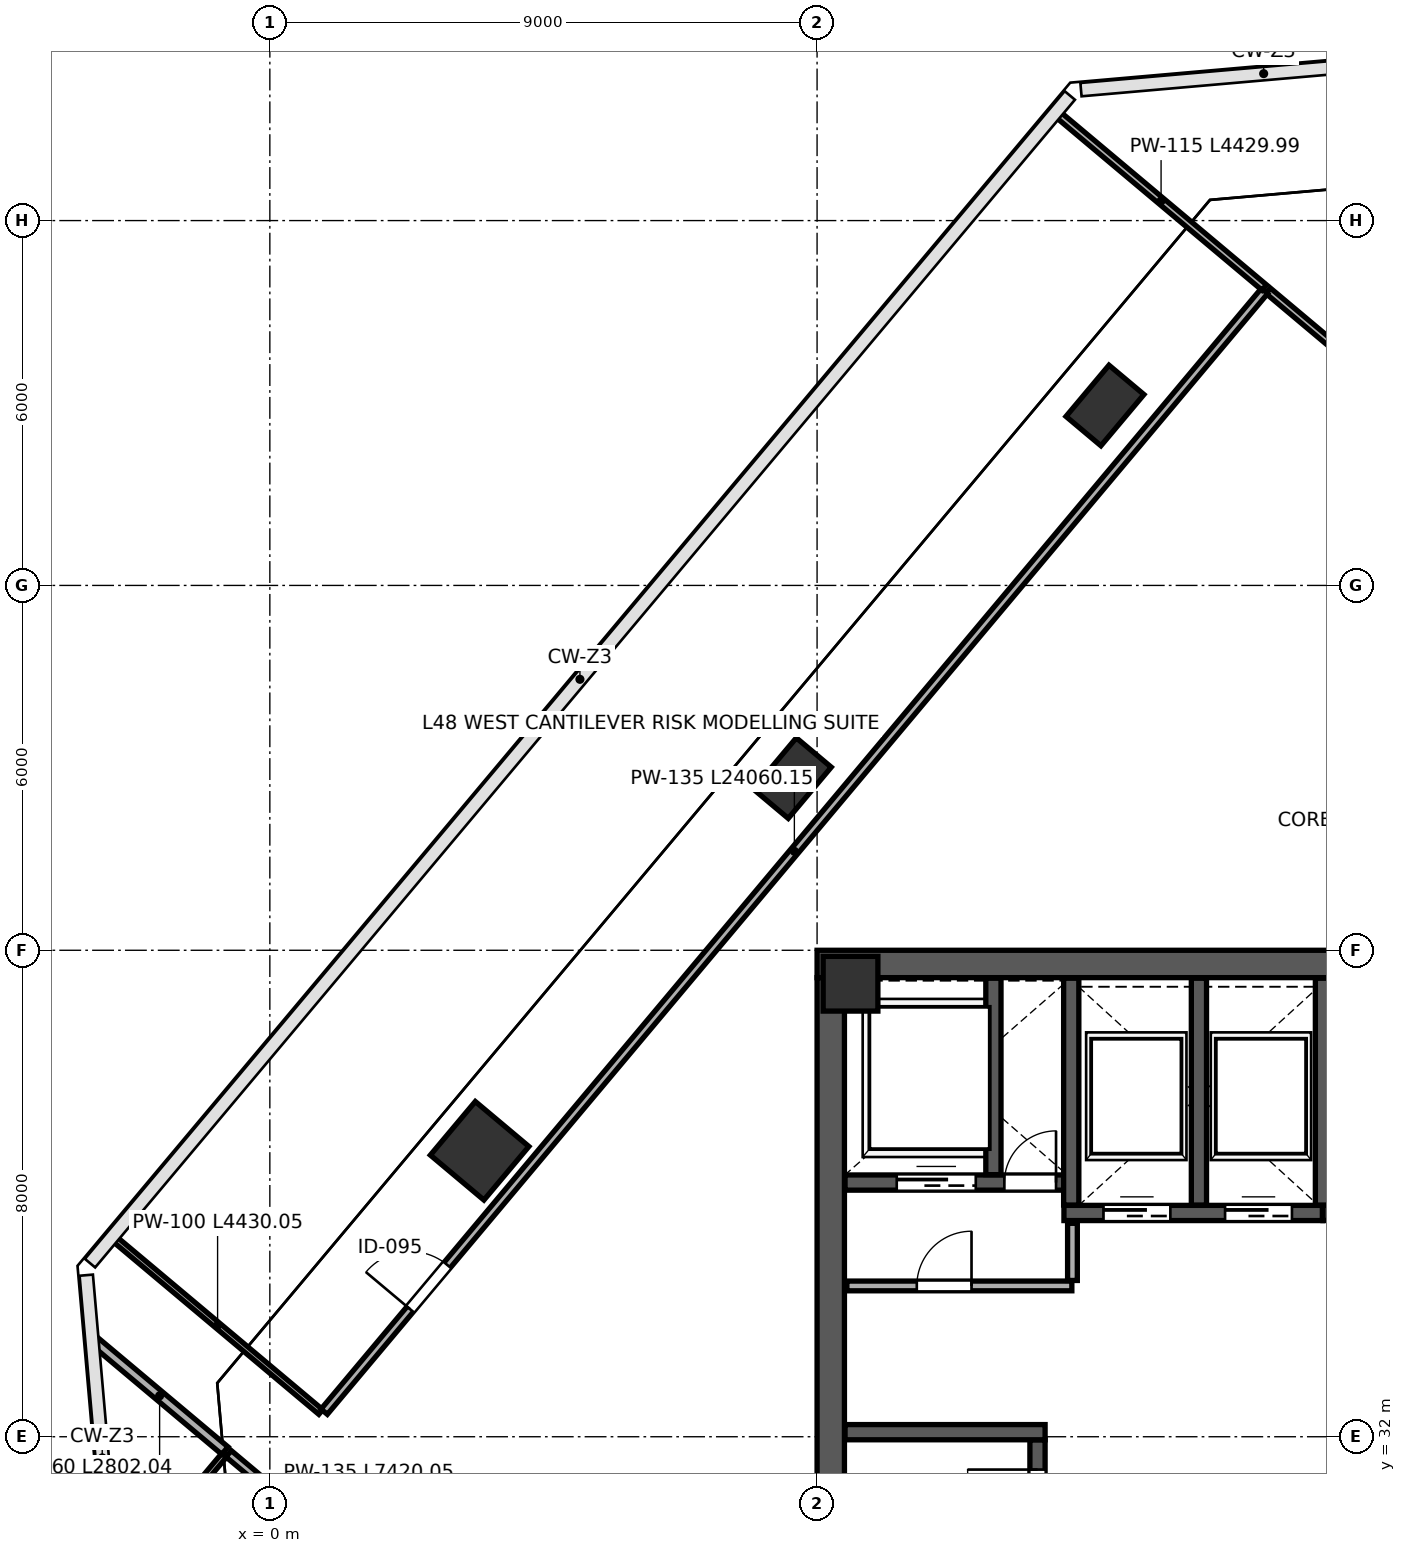
"""IFC4 building model, lengths in metres.
Left out: names, types, materials, properties, quantities, classifications, styles, units other than length and angle.
Written with IfcOpenShell. Run it as: python <this file> out.ifc"""

import sys

from ifc_helpers import new_model, si_unit, direction, frame, frame_2d, origin, origin_2d, place, context, subcontext, project, spatial, rectangle, extrude, source, transform, mapped, element, fill, save


model = new_model("IFC4")
c1 = context("Model", 3, precision=1e-05, world=origin(), true_north=direction((0.0, 1.0)))
c2 = subcontext(c1, "Body", "Model", "MODEL_VIEW")
j1 = project(units=[si_unit("LENGTHUNIT", "METRE"), si_unit("PLANEANGLEUNIT", "RADIAN")], contexts=[c1])
p1 = place(None, origin())
s1 = spatial("IfcSite", under=j1, at=p1, CompositionType="ELEMENT")
p2 = place(p1, origin())
s2 = spatial("IfcBuilding", under=s1, at=p2, CompositionType="ELEMENT")
p3 = place(p2, frame((0.0, 0.0, 215.2)))
s3 = spatial("IfcBuildingStorey", under=s2, at=p3, CompositionType="ELEMENT", Elevation=215.2)
m1 = source(origin(), c2, "Body", "SweptSolid", [
    extrude(rectangle(XDim=0.9, YDim=0.9, at=origin_2d()), origin(), (0.0, 0.0, 1.0), 5.399),
])
p4 = place(p3, frame((9.55, 39.45, 0.001), z_axis=(0.0, 0.0, 1.0), x_axis=(1.0, 0.0, 0.0)))
e1 = element("IfcColumn", 1, at=p4, inside=s3, PredefinedType="COLUMN", context=c2, shape_type="MappedRepresentation", body=[
    mapped(m1, transform((0.0, 0.0, 0.0), scale=1.0)),
])
m2 = source(origin(), c2, "Body", "SweptSolid", [
    extrude(rectangle(XDim=1.15, YDim=1.15, at=origin_2d()), origin(), (0.0, 0.0, 1.0), 5.399),
])
p5 = place(p3, frame((3.45, 36.703, 0.001), z_axis=(0.0, 0.0, 1.0), x_axis=(-0.766044443119, 0.642787609687, 0.0)))
e2 = element("IfcColumn", 2, at=p5, inside=s3, PredefinedType="COLUMN", context=c2, shape_type="MappedRepresentation", body=[
    mapped(m2, transform((0.0, 0.0, 0.0), scale=1.0)),
])
m3 = source(origin(), c2, "Body", "SweptSolid", [
    extrude(rectangle(XDim=0.75, YDim=1.1, at=origin_2d()), origin(), (0.0, 0.0, 1.0), 5.399),
])
for number, where, z_axis, x_axis in (
    (3, (8.592, 42.831, 0.001), (0.0, 0.0, 1.0), (-0.766, 0.643, 0.0)),
    (4, (13.735, 48.959, 0.001), (0.0, 0.0, 1.0), (-0.766, 0.643, 0.0)),
):
    element("IfcColumn", number, at=place(p3, frame(where, z_axis=z_axis, x_axis=x_axis)), inside=s3, PredefinedType="PILASTER", context=c2, shape_type="MappedRepresentation", body=[
        mapped(m3, transform((0.0, 0.0, 0.0), scale=1.0)),
    ])
p6 = place(p3, frame((9.225, 24.45, 0.0), z_axis=(0.0, 0.0, 1.0), x_axis=(0.0, 1.0, 0.0)))
e5 = element("IfcWall", 5, at=p6, inside=s3, PredefinedType="SHEAR", context=c2, shape_type="SweptSolid", body=[
    extrude(rectangle(XDim=15.1, YDim=0.45, at=frame_2d((7.55, 0.0))), origin(), (0.0, 0.0, 1.0), 5.16),
])
p7 = place(p3, frame((9.0, 39.775, 0.0), z_axis=(0.0, 0.0, 1.0), x_axis=(1.0, 0.0, 0.0)))
e6 = element("IfcWall", 6, at=p7, inside=s3, PredefinedType="SHEAR", context=c2, shape_type="SweptSolid", body=[
    extrude(rectangle(XDim=18.0, YDim=0.45, at=frame_2d((9.0, 0.0))), origin(), (0.0, 0.0, 1.0), 5.16),
])
p8 = place(p3, frame((12.625, 24.46, 0.0), z_axis=(0.0, 0.0, 1.0), x_axis=(0.0, 1.0, 0.0)))
e7 = element("IfcWall", 7, at=p8, inside=s3, PredefinedType="SHEAR", context=c2, shape_type="SweptSolid", body=[
    extrude(rectangle(XDim=7.49, YDim=0.25, at=frame_2d((3.745, 0.0))), origin(), (0.0, 0.0, 1.0), 5.16),
])
p9 = place(p8, frame((5.85, 0.0, 0.0)))
e8 = element("IfcOpeningElement", 8, at=p9, cuts=e7, PredefinedType="OPENING", context=c2, shape_type="SweptSolid", body=[
    extrude(rectangle(XDim=1.15, YDim=2.2, at=frame_2d((0.575, 1.1))), frame((0.0, 0.135, 0.0), z_axis=(0.0, -1.0, 0.0), x_axis=(1.0, 0.0, 0.0)), (0.0, 0.0, 1.0), 0.27),
])
p10 = place(p3, frame((9.46, 32.075, 0.0), z_axis=(0.0, 0.0, 1.0), x_axis=(1.0, 0.0, 0.0)))
e9 = element("IfcWall", 9, at=p10, inside=s3, PredefinedType="SHEAR", context=c2, shape_type="SweptSolid", body=[
    extrude(rectangle(XDim=3.29, YDim=0.25, at=frame_2d((1.645, 0.0))), origin(), (0.0, 0.0, 1.0), 5.16),
])
p11 = place(p3, frame((9.46, 36.18, 0.0), z_axis=(0.0, 0.0, 1.0), x_axis=(1.0, 0.0, 0.0)))
e10 = element("IfcWall", 10, at=p11, inside=s3, PredefinedType="SHEAR", context=c2, shape_type="SweptSolid", body=[
    extrude(rectangle(XDim=3.79, YDim=0.25, at=frame_2d((1.895, 0.0))), origin(), (0.0, 0.0, 1.0), 5.16),
])
p12 = place(p11, frame((2.62, 0.0, 0.0)))
e11 = element("IfcOpeningElement", 11, at=p12, cuts=e10, PredefinedType="OPENING", context=c2, shape_type="SweptSolid", body=[
    extrude(rectangle(XDim=0.85, YDim=2.1, at=frame_2d((0.425, 1.05))), frame((0.0, 0.135, 0.0), z_axis=(0.0, -1.0, 0.0), x_axis=(1.0, 0.0, 0.0)), (0.0, 0.0, 1.0), 0.27),
])
p13 = place(p11, frame((0.85, 0.0, 0.0)))
e12 = element("IfcOpeningElement", 12, at=p13, cuts=e10, PredefinedType="OPENING", context=c2, shape_type="SweptSolid", body=[
    extrude(rectangle(XDim=1.3, YDim=2.25, at=frame_2d((0.65, 1.125))), frame((0.0, 0.135, 0.0), z_axis=(0.0, -1.0, 0.0), x_axis=(1.0, 0.0, 0.0)), (0.0, 0.0, 1.0), 0.27),
])
p14 = place(p3, frame((11.9, 36.31, 0.0), z_axis=(0.0, 0.0, 1.0), x_axis=(0.0, 1.0, 0.0)))
e13 = element("IfcWall", 13, at=p14, inside=s3, PredefinedType="SHEAR", context=c2, shape_type="SweptSolid", body=[
    extrude(rectangle(XDim=3.23, YDim=0.25, at=frame_2d((1.615, 0.0))), origin(), (0.0, 0.0, 1.0), 5.16),
])
p15 = place(p3, frame((13.06, 35.68, 0.0), z_axis=(0.0, 0.0, 1.0), x_axis=(1.0, 0.0, 0.0)))
e14 = element("IfcWall", 14, at=p15, inside=s3, PredefinedType="SHEAR", context=c2, shape_type="SweptSolid", body=[
    extrude(rectangle(XDim=4.25, YDim=0.25, at=frame_2d((2.125, 0.0))), origin(), (0.0, 0.0, 1.0), 5.16),
])
p16 = place(p15, frame((0.65, 0.0, 0.0)))
e15 = element("IfcOpeningElement", 15, at=p16, cuts=e14, PredefinedType="OPENING", context=c2, shape_type="SweptSolid", body=[
    extrude(rectangle(XDim=1.1, YDim=2.2, at=frame_2d((0.55, 1.1))), frame((0.0, 0.135, 0.0), z_axis=(0.0, -1.0, 0.0), x_axis=(1.0, 0.0, 0.0)), (0.0, 0.0, 1.0), 0.27),
])
p17 = place(p15, frame((2.65, 0.0, 0.0)))
e16 = element("IfcOpeningElement", 16, at=p17, cuts=e14, PredefinedType="OPENING", context=c2, shape_type="SweptSolid", body=[
    extrude(rectangle(XDim=1.1, YDim=2.2, at=frame_2d((0.55, 1.1))), frame((0.0, 0.135, 0.0), z_axis=(0.0, -1.0, 0.0), x_axis=(1.0, 0.0, 0.0)), (0.0, 0.0, 1.0), 0.27),
])
for number, where, z_axis, x_axis in (
    (17, (13.18, 35.81, 0.0), (0.0, 0.0, 1.0), (0.0, 1.0, 0.0)),
    (18, (15.28, 35.81, 0.0), (0.0, 0.0, 1.0), (0.0, 1.0, 0.0)),
):
    element("IfcWall", number, at=place(p3, frame(where, z_axis=z_axis, x_axis=x_axis)), inside=s3, PredefinedType="SHEAR", context=c2, shape_type="SweptSolid", body=[
        extrude(rectangle(XDim=3.73, YDim=0.25, at=frame_2d((1.865, 0.0))), origin(), (0.0, 0.0, 1.0), 5.16),
    ])
p18 = place(p3, frame((17.32, 35.68, 0.0), z_axis=(0.0, 0.0, 1.0), x_axis=(1.0, 0.0, 0.0)))
e19 = element("IfcWall", 19, at=p18, inside=s3, PredefinedType="SHEAR", context=c2, shape_type="SweptSolid", body=[
    extrude(rectangle(XDim=3.87, YDim=0.25, at=frame_2d((1.935, 0.0))), origin(), (0.0, 0.0, 1.0), 5.16),
])
p19 = place(p18, frame((0.45, 0.0, 0.0)))
e20 = element("IfcOpeningElement", 20, at=p19, cuts=e19, PredefinedType="OPENING", context=c2, shape_type="SweptSolid", body=[
    extrude(rectangle(XDim=1.1, YDim=2.2, at=frame_2d((0.55, 1.1))), frame((0.0, 0.135, 0.0), z_axis=(0.0, -1.0, 0.0), x_axis=(1.0, 0.0, 0.0)), (0.0, 0.0, 1.0), 0.27),
])
p20 = place(p18, frame((2.35, 0.0, 0.0)))
e21 = element("IfcOpeningElement", 21, at=p20, cuts=e19, PredefinedType="OPENING", context=c2, shape_type="SweptSolid", body=[
    extrude(rectangle(XDim=1.1, YDim=2.2, at=frame_2d((0.55, 1.1))), frame((0.0, 0.135, 0.0), z_axis=(0.0, -1.0, 0.0), x_axis=(1.0, 0.0, 0.0)), (0.0, 0.0, 1.0), 0.27),
])
p21 = place(p3, frame((17.32, 35.81, 0.0), z_axis=(0.0, 0.0, 1.0), x_axis=(0.0, 1.0, 0.0)))
e22 = element("IfcWall", 22, at=p21, inside=s3, PredefinedType="SHEAR", context=c2, shape_type="SweptSolid", body=[
    extrude(rectangle(XDim=3.73, YDim=0.25, at=frame_2d((1.865, 0.0))), origin(), (0.0, 0.0, 1.0), 5.16),
])
p22 = place(p3, frame((9.49, 34.48, 0.0), z_axis=(0.0, 0.0, 1.0), x_axis=(1.0, 0.0, 0.0)))
e23 = element("IfcWall", 23, at=p22, inside=s3, PredefinedType="PARTITIONING", context=c2, shape_type="SweptSolid", body=[
    extrude(rectangle(XDim=3.7, YDim=0.16, at=frame_2d((1.85, 0.0))), origin(), (0.0, 0.0, 1.0), 5.16),
])
p23 = place(p22, frame((1.15, 0.0, 0.0)))
e24 = element("IfcOpeningElement", 24, at=p23, cuts=e23, PredefinedType="OPENING", context=c2, shape_type="SweptSolid", body=[
    extrude(rectangle(XDim=0.9, YDim=2.15, at=frame_2d((0.45, 1.075))), frame((0.0, 0.09, 0.0), z_axis=(0.0, -1.0, 0.0), x_axis=(1.0, 0.0, 0.0)), (0.0, 0.0, 1.0), 0.18),
])
p24 = place(p3, frame((13.2, 34.57, 0.0), z_axis=(0.0, 0.0, 1.0), x_axis=(0.0, 1.0, 0.0)))
e25 = element("IfcWall", 25, at=p24, inside=s3, PredefinedType="PARTITIONING", context=c2, shape_type="SweptSolid", body=[
    extrude(rectangle(XDim=0.94, YDim=0.16, at=frame_2d((0.47, 0.0))), origin(), (0.0, 0.0, 1.0), 5.16),
])
p25 = place(p3, frame((-2.536, 29.569, 0.0), z_axis=(0.0, 0.0, 1.0), x_axis=(0.642777228426, 0.766053153911, 0.0)))
e26 = element("IfcWall", 26, at=p25, inside=s3, PredefinedType="PARTITIONING", context=c2, shape_type="SweptSolid", body=[
    extrude(rectangle(XDim=2.802, YDim=0.1, at=frame_2d((1.401, 0.0))), origin(), (0.0, 0.0, 1.0), 5.16),
])
p26 = place(p3, frame((-2.886, 33.573, 0.0), z_axis=(0.0, 0.0, 1.0), x_axis=(0.766060058075, -0.642769000048, 0.0)))
e27 = element("IfcWall", 27, at=p26, inside=s3, PredefinedType="PARTITIONING", context=c2, shape_type="SweptSolid", body=[
    extrude(rectangle(XDim=2.802, YDim=0.16, at=frame_2d((1.401, 0.0))), origin(), (0.0, 0.0, 1.0), 5.16),
])
p27 = place(p3, frame((-0.678, 31.721, 0.0), z_axis=(0.0, 0.0, 1.0), x_axis=(0.766043108328, -0.642789200425, 0.0)))
e28 = element("IfcWall", 28, at=p27, inside=s3, PredefinedType="PARTITIONING", context=c2, shape_type="SweptSolid", body=[
    extrude(rectangle(XDim=7.42, YDim=0.135, at=frame_2d((3.71, 0.0))), origin(), (0.0, 0.0, 1.0), 5.16),
])
p28 = place(p27, frame((2.9, 0.0, 0.0)))
e29 = element("IfcOpeningElement", 29, at=p28, cuts=e28, PredefinedType="OPENING", context=c2, shape_type="SweptSolid", body=[
    extrude(rectangle(XDim=0.9, YDim=2.15, at=frame_2d((0.45, 1.075))), frame((0.0, 0.078, 0.0), z_axis=(0.0, -1.0, 0.0), x_axis=(1.0, 0.0, 0.0)), (0.0, 0.0, 1.0), 0.155),
])
p29 = place(p27, frame((5.0, 0.0, 0.0)))
e30 = element("IfcOpeningElement", 30, at=p29, cuts=e28, PredefinedType="OPENING", context=c2, shape_type="SweptSolid", body=[
    extrude(rectangle(XDim=0.95, YDim=2.15, at=frame_2d((0.475, 1.075))), frame((0.0, 0.078, 0.0), z_axis=(0.0, -1.0, 0.0), x_axis=(1.0, 0.0, 0.0)), (0.0, 0.0, 1.0), 0.155),
])
p30 = place(p3, frame((16.416, 50.848, 0.0), z_axis=(0.0, 0.0, 1.0), x_axis=(0.766042472976, -0.642789957604, 0.0)))
e31 = element("IfcWall", 31, at=p30, inside=s3, PredefinedType="PARTITIONING", context=c2, shape_type="SweptSolid", body=[
    extrude(rectangle(XDim=27.03, YDim=0.115, at=frame_2d((13.515, 0.0))), origin(), (0.0, 0.0, 1.0), 5.16),
])
p31 = place(p30, frame((18.8, 0.0, 0.0)))
e32 = element("IfcOpeningElement", 32, at=p31, cuts=e31, PredefinedType="OPENING", context=c2, shape_type="SweptSolid", body=[
    extrude(rectangle(XDim=0.95, YDim=2.15, at=frame_2d((0.475, 1.075))), frame((0.0, 0.067, 0.0), z_axis=(0.0, -1.0, 0.0), x_axis=(1.0, 0.0, 0.0)), (0.0, 0.0, 1.0), 0.135),
])
p32 = place(p3, frame((-2.556, 35.254, 0.0), z_axis=(0.0, 0.0, 1.0), x_axis=(0.76603046424, -0.642804268698, 0.0)))
e33 = element("IfcWall", 33, at=p32, inside=s3, PredefinedType="PARTITIONING", context=c2, shape_type="SweptSolid", body=[
    extrude(rectangle(XDim=4.43, YDim=0.1, at=frame_2d((2.215, 0.0))), origin(), (0.0, 0.0, 1.0), 5.16),
])
p33 = place(p3, frame((0.894, 32.412, 0.0), z_axis=(0.0, 0.0, 1.0), x_axis=(0.64277673271, 0.766053569854, 0.0)))
e34 = element("IfcWall", 34, at=p33, inside=s3, PredefinedType="PARTITIONING", context=c2, shape_type="SweptSolid", body=[
    extrude(rectangle(XDim=24.06, YDim=0.135, at=frame_2d((12.03, 0.0))), origin(), (0.0, 0.0, 1.0), 5.16),
])
p34 = place(p33, frame((2.2, 0.0, 0.0)))
e35 = element("IfcOpeningElement", 35, at=p34, cuts=e34, PredefinedType="OPENING", context=c2, shape_type="SweptSolid", body=[
    extrude(rectangle(XDim=0.95, YDim=2.15, at=frame_2d((0.475, 1.075))), frame((0.0, 0.078, 0.0), z_axis=(0.0, -1.0, 0.0), x_axis=(1.0, 0.0, 0.0)), (0.0, 0.0, 1.0), 0.155),
])
p35 = place(p3, frame((12.961, 53.747, 0.0), z_axis=(0.0, 0.0, 1.0), x_axis=(0.766057601156, -0.642771928222, 0.0)))
e36 = element("IfcWall", 36, at=p35, inside=s3, PredefinedType="PARTITIONING", context=c2, shape_type="SweptSolid", body=[
    extrude(rectangle(XDim=4.43, YDim=0.115, at=frame_2d((2.215, 0.0))), origin(), (0.0, 0.0, 1.0), 5.16),
])
m4 = source(origin(), c2, "Body", "SweptSolid", [
    extrude(rectangle(XDim=1.15, YDim=2.2, at=frame_2d((0.575, 1.1))), frame((0.0, 0.025, 0.0), z_axis=(0.0, -1.0, 0.0), x_axis=(1.0, 0.0, 0.0)), (0.0, 0.0, 1.0), 0.05),
])
p36 = place(p9, origin())
e37 = element("IfcDoor", 37, at=p36, inside=s3, OperationType="SINGLE_SWING_RIGHT", PredefinedType="DOOR", context=c2, shape_type="MappedRepresentation", body=[
    mapped(m4, transform((0.0, 0.0, 0.0), scale=1.0)),
])
fill(e8, e37)
m5 = source(origin(), c2, "Body", "SweptSolid", [
    extrude(rectangle(XDim=0.85, YDim=2.1, at=frame_2d((0.425, 1.05))), frame((0.0, 0.025, 0.0), z_axis=(0.0, -1.0, 0.0), x_axis=(1.0, 0.0, 0.0)), (0.0, 0.0, 1.0), 0.05),
])
p37 = place(p12, origin())
e38 = element("IfcDoor", 38, at=p37, inside=s3, OperationType="SINGLE_SWING_RIGHT", PredefinedType="DOOR", context=c2, shape_type="MappedRepresentation", body=[
    mapped(m5, transform((0.0, 0.0, 0.0), scale=1.0)),
])
fill(e11, e38)
m6 = source(origin(), c2, "Body", "SweptSolid", [
    extrude(rectangle(XDim=1.1, YDim=2.2, at=frame_2d((0.55, 1.1))), frame((0.0, 0.025, 0.0), z_axis=(0.0, -1.0, 0.0), x_axis=(1.0, 0.0, 0.0)), (0.0, 0.0, 1.0), 0.05),
])
p38 = place(p16, origin())
e39 = element("IfcDoor", 39, at=p38, inside=s3, OperationType="SLIDING_TO_LEFT", PredefinedType="DOOR", context=c2, shape_type="MappedRepresentation", body=[
    mapped(m6, transform((0.0, 0.0, 0.0), scale=1.0)),
])
fill(e15, e39)
p39 = place(p17, origin())
e40 = element("IfcDoor", 40, at=p39, inside=s3, OperationType="SLIDING_TO_RIGHT", PredefinedType="DOOR", context=c2, shape_type="MappedRepresentation", body=[
    mapped(m6, transform((0.0, 0.0, 0.0), scale=1.0)),
])
fill(e16, e40)
m7 = source(origin(), c2, "Body", "SweptSolid", [
    extrude(rectangle(XDim=1.3, YDim=2.25, at=frame_2d((0.65, 1.125))), frame((0.0, 0.025, 0.0), z_axis=(0.0, -1.0, 0.0), x_axis=(1.0, 0.0, 0.0)), (0.0, 0.0, 1.0), 0.05),
])
p40 = place(p13, origin())
e41 = element("IfcDoor", 41, at=p40, inside=s3, OperationType="SLIDING_TO_LEFT", PredefinedType="DOOR", context=c2, shape_type="MappedRepresentation", body=[
    mapped(m7, transform((0.0, 0.0, 0.0), scale=1.0)),
])
fill(e12, e41)
m8 = source(origin(), c2, "Body", "SweptSolid", [
    extrude(rectangle(XDim=0.9, YDim=2.15, at=frame_2d((0.45, 1.075))), frame((0.0, 0.025, 0.0), z_axis=(0.0, -1.0, 0.0), x_axis=(1.0, 0.0, 0.0)), (0.0, 0.0, 1.0), 0.05),
])
p41 = place(p23, origin())
e42 = element("IfcDoor", 42, at=p41, inside=s3, OperationType="SINGLE_SWING_RIGHT", PredefinedType="DOOR", context=c2, shape_type="MappedRepresentation", body=[
    mapped(m8, transform((0.0, 0.0, 0.0), scale=1.0)),
])
fill(e24, e42)
m9 = source(origin(), c2, "Body", "SweptSolid", [
    extrude(rectangle(XDim=0.95, YDim=2.15, at=frame_2d((0.475, 1.075))), frame((0.0, 0.025, 0.0), z_axis=(0.0, -1.0, 0.0), x_axis=(1.0, 0.0, 0.0)), (0.0, 0.0, 1.0), 0.05),
])
p42 = place(p34, origin())
e43 = element("IfcDoor", 43, at=p42, inside=s3, OperationType="SINGLE_SWING_LEFT", PredefinedType="DOOR", context=c2, shape_type="MappedRepresentation", body=[
    mapped(m9, transform((0.0, 0.0, 0.0), scale=1.0)),
])
fill(e35, e43)
save(model, sys.argv[1])
